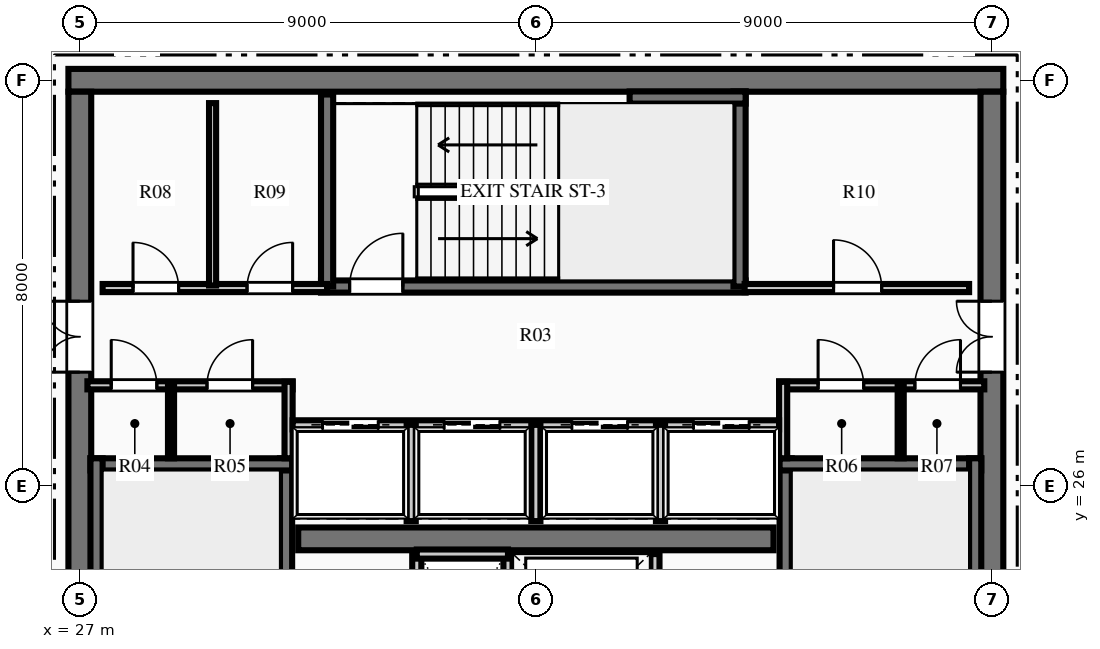
"""IFC4 building model, lengths in metres.
Left out: names, types, materials, properties, quantities, classifications, styles, units other than length and angle.
Written with IfcOpenShell. Run it as: python <this file> out.ifc"""

import sys

from ifc_helpers import new_model, si_unit, direction, frame, frame_2d, origin, place, context, subcontext, project, spatial, rectangle, extrude, element, fill, save


model = new_model("IFC4")
c1 = context("Model", 3, precision=1e-05, world=origin(), true_north=direction((0.0, 1.0)))
c2 = subcontext(c1, "Body", "Model", "MODEL_VIEW")
j1 = project(units=[si_unit("LENGTHUNIT", "METRE"), si_unit("PLANEANGLEUNIT", "RADIAN")], contexts=[c1])
p1 = place(None, origin())
s1 = spatial("IfcSite", under=j1, at=p1, CompositionType="ELEMENT")
p2 = place(p1, origin())
s2 = spatial("IfcBuilding", under=s1, at=p2, CompositionType="ELEMENT")
p3 = place(p2, frame((0.0, 0.0, 343.95)))
s3 = spatial("IfcBuildingStorey", under=s2, at=p3, CompositionType="ELEMENT", Elevation=343.95)
p4 = place(p3, frame((26.775, 34.0, 0.0), z_axis=(0.0, 0.0, 1.0), x_axis=(1.0, 0.0, 0.0)))
e1 = element("IfcWall", 1, at=p4, inside=s3, PredefinedType="SHEAR", context=c2, shape_type="SweptSolid", body=[
    extrude(rectangle(XDim=18.45, YDim=0.45, at=frame_2d((9.225, 0.0))), origin(), (0.0, 0.0, 1.0), 3.75),
])
p5 = place(p3, frame((27.0, 18.225, 0.0), z_axis=(0.0, 0.0, 1.0), x_axis=(0.0, 1.0, 0.0)))
e2 = element("IfcWall", 2, at=p5, inside=s3, PredefinedType="SHEAR", context=c2, shape_type="SweptSolid", body=[
    extrude(rectangle(XDim=15.55, YDim=0.45, at=frame_2d((7.775, 0.0))), origin(), (0.0, 0.0, 1.0), 3.75),
])
p6 = place(p5, frame((10.015, 0.0, 0.0)))
e3 = element("IfcOpeningElement", 3, at=p6, cuts=e2, PredefinedType="OPENING", context=c2, shape_type="SweptSolid", body=[
    extrude(rectangle(XDim=1.4, YDim=2.2, at=frame_2d((0.7, 1.1))), frame((0.0, 0.235, 0.0), z_axis=(0.0, -1.0, 0.0), x_axis=(1.0, 0.0, 0.0)), (0.0, 0.0, 1.0), 0.47),
])
p7 = place(p3, frame((45.0, 18.225, 0.0), z_axis=(0.0, 0.0, 1.0), x_axis=(0.0, 1.0, 0.0)))
e4 = element("IfcWall", 4, at=p7, inside=s3, PredefinedType="SHEAR", context=c2, shape_type="SweptSolid", body=[
    extrude(rectangle(XDim=15.55, YDim=0.45, at=frame_2d((7.775, 0.0))), origin(), (0.0, 0.0, 1.0), 3.75),
])
p8 = place(p7, frame((10.015, 0.0, 0.0)))
e5 = element("IfcOpeningElement", 5, at=p8, cuts=e4, PredefinedType="OPENING", context=c2, shape_type="SweptSolid", body=[
    extrude(rectangle(XDim=1.4, YDim=2.2, at=frame_2d((0.7, 1.1))), frame((0.0, 0.235, 0.0), z_axis=(0.0, -1.0, 0.0), x_axis=(1.0, 0.0, 0.0)), (0.0, 0.0, 1.0), 0.47),
])
p9 = place(p3, frame((31.31, 24.95, 0.0), z_axis=(0.0, 0.0, 1.0), x_axis=(1.0, 0.0, 0.0)))
e6 = element("IfcWall", 6, at=p9, inside=s3, PredefinedType="SHEAR", context=c2, shape_type="SweptSolid", body=[
    extrude(rectangle(XDim=9.38, YDim=0.45, at=frame_2d((4.69, 0.0))), origin(), (0.0, 0.0, 1.0), 3.75),
])
p10 = place(p3, frame((31.07, 18.28, 0.0), z_axis=(0.0, 0.0, 1.0), x_axis=(0.0, 1.0, 0.0)))
e7 = element("IfcWall", 7, at=p10, inside=s3, PredefinedType="SHEAR", context=c2, shape_type="SweptSolid", body=[
    extrude(rectangle(XDim=8.26, YDim=0.24, at=frame_2d((4.13, 0.0))), origin(), (0.0, 0.0, 1.0), 3.75),
])
p11 = place(p10, frame((0.365, 0.0, 0.0)))
e8 = element("IfcOpeningElement", 8, at=p11, cuts=e7, PredefinedType="OPENING", context=c2, shape_type="SweptSolid", body=[
    extrude(rectangle(XDim=1.05, YDim=2.15, at=frame_2d((0.525, 1.075))), frame((0.0, 0.13, 0.0), z_axis=(0.0, -1.0, 0.0), x_axis=(1.0, 0.0, 0.0)), (0.0, 0.0, 1.0), 0.26),
])
p12 = place(p3, frame((27.21, 26.42, 0.0), z_axis=(0.0, 0.0, 1.0), x_axis=(1.0, 0.0, 0.0)))
e9 = element("IfcWall", 9, at=p12, inside=s3, PredefinedType="SHEAR", context=c2, shape_type="SweptSolid", body=[
    extrude(rectangle(XDim=3.98, YDim=0.24, at=frame_2d((1.99, 0.0))), origin(), (0.0, 0.0, 1.0), 3.75),
])
p13 = place(p3, frame((27.33, 18.28, 0.0), z_axis=(0.0, 0.0, 1.0), x_axis=(0.0, 1.0, 0.0)))
e10 = element("IfcWall", 10, at=p13, inside=s3, PredefinedType="SHEAR", context=c2, shape_type="SweptSolid", body=[
    extrude(rectangle(XDim=8.26, YDim=0.24, at=frame_2d((4.13, 0.0))), origin(), (0.0, 0.0, 1.0), 3.75),
])
p14 = place(p3, frame((40.93, 18.28, 0.0), z_axis=(0.0, 0.0, 1.0), x_axis=(0.0, 1.0, 0.0)))
e11 = element("IfcWall", 11, at=p14, inside=s3, PredefinedType="SHEAR", context=c2, shape_type="SweptSolid", body=[
    extrude(rectangle(XDim=8.26, YDim=0.24, at=frame_2d((4.13, 0.0))), origin(), (0.0, 0.0, 1.0), 3.75),
])
p15 = place(p14, frame((0.365, 0.0, 0.0)))
e12 = element("IfcOpeningElement", 12, at=p15, cuts=e11, PredefinedType="OPENING", context=c2, shape_type="SweptSolid", body=[
    extrude(rectangle(XDim=1.05, YDim=2.15, at=frame_2d((0.525, 1.075))), frame((0.0, 0.13, 0.0), z_axis=(0.0, -1.0, 0.0), x_axis=(1.0, 0.0, 0.0)), (0.0, 0.0, 1.0), 0.26),
])
p16 = place(p3, frame((40.81, 26.42, 0.0), z_axis=(0.0, 0.0, 1.0), x_axis=(1.0, 0.0, 0.0)))
e13 = element("IfcWall", 13, at=p16, inside=s3, PredefinedType="SHEAR", context=c2, shape_type="SweptSolid", body=[
    extrude(rectangle(XDim=3.98, YDim=0.24, at=frame_2d((1.99, 0.0))), origin(), (0.0, 0.0, 1.0), 3.75),
])
p17 = place(p3, frame((44.67, 18.28, 0.0), z_axis=(0.0, 0.0, 1.0), x_axis=(0.0, 1.0, 0.0)))
e14 = element("IfcWall", 14, at=p17, inside=s3, PredefinedType="SHEAR", context=c2, shape_type="SweptSolid", body=[
    extrude(rectangle(XDim=8.26, YDim=0.24, at=frame_2d((4.13, 0.0))), origin(), (0.0, 0.0, 1.0), 3.75),
])
p18 = place(p3, frame((31.76, 29.93, 0.0), z_axis=(0.0, 0.0, 1.0), x_axis=(1.0, 0.0, 0.0)))
e15 = element("IfcWall", 15, at=p18, inside=s3, PredefinedType="SHEAR", context=c2, shape_type="SweptSolid", body=[
    extrude(rectangle(XDim=8.38, YDim=0.24, at=frame_2d((4.19, 0.0))), origin(), (0.0, 0.0, 1.0), 3.75),
])
p19 = place(p18, frame((0.565, 0.0, 0.0)))
e16 = element("IfcOpeningElement", 16, at=p19, cuts=e15, PredefinedType="OPENING", context=c2, shape_type="SweptSolid", body=[
    extrude(rectangle(XDim=1.05, YDim=2.15, at=frame_2d((0.525, 1.075))), frame((0.0, 0.13, 0.0), z_axis=(0.0, -1.0, 0.0), x_axis=(1.0, 0.0, 0.0)), (0.0, 0.0, 1.0), 0.26),
])
p20 = place(p3, frame((31.88, 29.93, 0.0), z_axis=(0.0, 0.0, 1.0), x_axis=(0.0, 1.0, 0.0)))
e17 = element("IfcWall", 17, at=p20, inside=s3, PredefinedType="SHEAR", context=c2, shape_type="SweptSolid", body=[
    extrude(rectangle(XDim=3.79, YDim=0.24, at=frame_2d((1.895, 0.0))), origin(), (0.0, 0.0, 1.0), 3.75),
])
p21 = place(p3, frame((40.02, 29.93, 0.0), z_axis=(0.0, 0.0, 1.0), x_axis=(0.0, 1.0, 0.0)))
e18 = element("IfcWall", 18, at=p21, inside=s3, PredefinedType="SHEAR", context=c2, shape_type="SweptSolid", body=[
    extrude(rectangle(XDim=3.85, YDim=0.24, at=frame_2d((1.925, 0.0))), origin(), (0.0, 0.0, 1.0), 3.75),
])
p22 = place(p3, frame((37.85, 33.66, 0.0), z_axis=(0.0, 0.0, 1.0), x_axis=(1.0, 0.0, 0.0)))
e19 = element("IfcWall", 19, at=p22, inside=s3, PredefinedType="SHEAR", context=c2, shape_type="SweptSolid", body=[
    extrude(rectangle(XDim=2.29, YDim=0.24, at=frame_2d((1.145, 0.0))), origin(), (0.0, 0.0, 1.0), 3.75),
])
for number, where, z_axis, x_axis in (
    (20, (33.65, 22.05, 0.0), (0.0, 0.0, 1.0), (0.0, 1.0, 0.0)),
    (21, (35.45, 22.05, 0.0), (0.0, 0.0, 1.0), (0.0, 1.0, 0.0)),
):
    element("IfcWall", number, at=place(p3, frame(where, z_axis=z_axis, x_axis=x_axis)), inside=s3, PredefinedType="PARTITIONING", context=c2, shape_type="SweptSolid", body=[
        extrude(rectangle(XDim=2.6, YDim=0.18, at=frame_2d((1.3, 0.0))), origin(), (0.0, 0.0, 1.0), 3.43),
    ])
p23 = place(p3, frame((33.65, 24.65, 0.0), z_axis=(0.0, 0.0, 1.0), x_axis=(1.0, 0.0, 0.0)))
e22 = element("IfcWall", 22, at=p23, inside=s3, PredefinedType="PARTITIONING", context=c2, shape_type="SweptSolid", body=[
    extrude(rectangle(XDim=1.8, YDim=0.18, at=frame_2d((0.9, 0.0))), origin(), (0.0, 0.0, 1.0), 3.43),
])
p24 = place(p3, frame((38.35, 22.05, 0.0), z_axis=(0.0, 0.0, 1.0), x_axis=(0.0, 1.0, 0.0)))
e23 = element("IfcWall", 23, at=p24, inside=s3, PredefinedType="PARTITIONING", context=c2, shape_type="SweptSolid", body=[
    extrude(rectangle(XDim=2.6, YDim=0.18, at=frame_2d((1.3, 0.0))), origin(), (0.0, 0.0, 1.0), 3.43),
])
p25 = place(p3, frame((27.15, 27.98, 0.0), z_axis=(0.0, 0.0, 1.0), x_axis=(1.0, 0.0, 0.0)))
e24 = element("IfcWall", 24, at=p25, inside=s3, PredefinedType="PARTITIONING", context=c2, shape_type="SweptSolid", body=[
    extrude(rectangle(XDim=4.05, YDim=0.16, at=frame_2d((2.025, 0.0))), origin(), (0.0, 0.0, 1.0), 3.43),
])
p26 = place(p25, frame((0.47, 0.0, 0.0)))
e25 = element("IfcOpeningElement", 25, at=p26, cuts=e24, PredefinedType="OPENING", context=c2, shape_type="SweptSolid", body=[
    extrude(rectangle(XDim=0.9, YDim=2.15, at=frame_2d((0.45, 1.075))), frame((0.0, 0.09, 0.0), z_axis=(0.0, -1.0, 0.0), x_axis=(1.0, 0.0, 0.0)), (0.0, 0.0, 1.0), 0.18),
])
p27 = place(p25, frame((2.36, 0.0, 0.0)))
e26 = element("IfcOpeningElement", 26, at=p27, cuts=e24, PredefinedType="OPENING", context=c2, shape_type="SweptSolid", body=[
    extrude(rectangle(XDim=0.9, YDim=2.15, at=frame_2d((0.45, 1.075))), frame((0.0, 0.09, 0.0), z_axis=(0.0, -1.0, 0.0), x_axis=(1.0, 0.0, 0.0)), (0.0, 0.0, 1.0), 0.18),
])
p28 = place(p3, frame((31.12, 26.54, 0.0), z_axis=(0.0, 0.0, 1.0), x_axis=(0.0, 1.0, 0.0)))
e27 = element("IfcWall", 27, at=p28, inside=s3, PredefinedType="PARTITIONING", context=c2, shape_type="SweptSolid", body=[
    extrude(rectangle(XDim=1.51, YDim=0.16, at=frame_2d((0.755, 0.0))), origin(), (0.0, 0.0, 1.0), 3.43),
])
p29 = place(p3, frame((40.8, 27.98, 0.0), z_axis=(0.0, 0.0, 1.0), x_axis=(1.0, 0.0, 0.0)))
e28 = element("IfcWall", 28, at=p29, inside=s3, PredefinedType="PARTITIONING", context=c2, shape_type="SweptSolid", body=[
    extrude(rectangle(XDim=4.05, YDim=0.16, at=frame_2d((2.025, 0.0))), origin(), (0.0, 0.0, 1.0), 3.43),
])
p30 = place(p29, frame((0.77, 0.0, 0.0)))
e29 = element("IfcOpeningElement", 29, at=p30, cuts=e28, PredefinedType="OPENING", context=c2, shape_type="SweptSolid", body=[
    extrude(rectangle(XDim=0.9, YDim=2.15, at=frame_2d((0.45, 1.075))), frame((0.0, 0.09, 0.0), z_axis=(0.0, -1.0, 0.0), x_axis=(1.0, 0.0, 0.0)), (0.0, 0.0, 1.0), 0.18),
])
p31 = place(p29, frame((2.68, 0.0, 0.0)))
e30 = element("IfcOpeningElement", 30, at=p31, cuts=e28, PredefinedType="OPENING", context=c2, shape_type="SweptSolid", body=[
    extrude(rectangle(XDim=0.9, YDim=2.15, at=frame_2d((0.45, 1.075))), frame((0.0, 0.09, 0.0), z_axis=(0.0, -1.0, 0.0), x_axis=(1.0, 0.0, 0.0)), (0.0, 0.0, 1.0), 0.18),
])
p32 = place(p3, frame((40.88, 26.54, 0.0), z_axis=(0.0, 0.0, 1.0), x_axis=(0.0, 1.0, 0.0)))
e31 = element("IfcWall", 31, at=p32, inside=s3, PredefinedType="PARTITIONING", context=c2, shape_type="SweptSolid", body=[
    extrude(rectangle(XDim=1.51, YDim=0.16, at=frame_2d((0.755, 0.0))), origin(), (0.0, 0.0, 1.0), 3.43),
])
for number, where, z_axis, x_axis in (
    (32, (28.8, 26.54, 0.0), (0.0, 0.0, 1.0), (0.0, 1.0, 0.0)),
    (33, (43.2, 26.54, 0.0), (0.0, 0.0, 1.0), (0.0, 1.0, 0.0)),
):
    element("IfcWall", number, at=place(p3, frame(where, z_axis=z_axis, x_axis=x_axis)), inside=s3, PredefinedType="PARTITIONING", context=c2, shape_type="SweptSolid", body=[
        extrude(rectangle(XDim=1.44, YDim=0.12, at=frame_2d((0.72, 0.0))), origin(), (0.0, 0.0, 1.0), 3.43),
    ])
p33 = place(p3, frame((27.45, 29.9, 0.0), z_axis=(0.0, 0.0, 1.0), x_axis=(1.0, 0.0, 0.0)))
e34 = element("IfcWall", 34, at=p33, inside=s3, PredefinedType="PARTITIONING", context=c2, shape_type="SweptSolid", body=[
    extrude(rectangle(XDim=4.43, YDim=0.16, at=frame_2d((2.215, 0.0))), origin(), (0.0, 0.0, 1.0), 3.43),
])
p34 = place(p33, frame((0.6, 0.0, 0.0)))
e35 = element("IfcOpeningElement", 35, at=p34, cuts=e34, PredefinedType="OPENING", context=c2, shape_type="SweptSolid", body=[
    extrude(rectangle(XDim=0.9, YDim=2.15, at=frame_2d((0.45, 1.075))), frame((0.0, 0.09, 0.0), z_axis=(0.0, -1.0, 0.0), x_axis=(1.0, 0.0, 0.0)), (0.0, 0.0, 1.0), 0.18),
])
p35 = place(p33, frame((2.85, 0.0, 0.0)))
e36 = element("IfcOpeningElement", 36, at=p35, cuts=e34, PredefinedType="OPENING", context=c2, shape_type="SweptSolid", body=[
    extrude(rectangle(XDim=0.9, YDim=2.15, at=frame_2d((0.45, 1.075))), frame((0.0, 0.09, 0.0), z_axis=(0.0, -1.0, 0.0), x_axis=(1.0, 0.0, 0.0)), (0.0, 0.0, 1.0), 0.18),
])
p36 = place(p3, frame((29.62, 29.95, 0.0), z_axis=(0.0, 0.0, 1.0), x_axis=(0.0, 1.0, 0.0)))
e37 = element("IfcWall", 37, at=p36, inside=s3, PredefinedType="PARTITIONING", context=c2, shape_type="SweptSolid", body=[
    extrude(rectangle(XDim=3.6, YDim=0.14, at=frame_2d((1.8, 0.0))), origin(), (0.0, 0.0, 1.0), 3.43),
])
p37 = place(p3, frame((40.12, 29.9, 0.0), z_axis=(0.0, 0.0, 1.0), x_axis=(1.0, 0.0, 0.0)))
e38 = element("IfcWall", 38, at=p37, inside=s3, PredefinedType="PARTITIONING", context=c2, shape_type="SweptSolid", body=[
    extrude(rectangle(XDim=4.43, YDim=0.16, at=frame_2d((2.215, 0.0))), origin(), (0.0, 0.0, 1.0), 3.43),
])
p38 = place(p37, frame((1.755, 0.0, 0.0)))
e39 = element("IfcOpeningElement", 39, at=p38, cuts=e38, PredefinedType="OPENING", context=c2, shape_type="SweptSolid", body=[
    extrude(rectangle(XDim=0.95, YDim=2.15, at=frame_2d((0.475, 1.075))), frame((0.0, 0.09, 0.0), z_axis=(0.0, -1.0, 0.0), x_axis=(1.0, 0.0, 0.0)), (0.0, 0.0, 1.0), 0.18),
])
p39 = place(p3, frame((31.2, 27.2, 0.0), z_axis=(0.0, 0.0, 1.0), x_axis=(1.0, 0.0, 0.0)))
e40 = element("IfcWall", 40, at=p39, inside=s3, PredefinedType="PARTITIONING", context=c2, shape_type="SweptSolid", body=[
    extrude(rectangle(XDim=9.6, YDim=0.18, at=frame_2d((4.8, 0.0))), origin(), (0.0, 0.0, 1.0), 3.43),
])
p40 = place(p39, frame((0.59, 0.0, 0.0)))
e41 = element("IfcOpeningElement", 41, at=p40, cuts=e40, PredefinedType="OPENING", context=c2, shape_type="SweptSolid", body=[
    extrude(rectangle(XDim=1.1, YDim=2.15, at=frame_2d((0.55, 1.075))), frame((0.0, 0.1, 0.0), z_axis=(0.0, -1.0, 0.0), x_axis=(1.0, 0.0, 0.0)), (0.0, 0.0, 1.0), 0.2),
])
p41 = place(p39, frame((2.99, 0.0, 0.0)))
e42 = element("IfcOpeningElement", 42, at=p41, cuts=e40, PredefinedType="OPENING", context=c2, shape_type="SweptSolid", body=[
    extrude(rectangle(XDim=1.1, YDim=2.15, at=frame_2d((0.55, 1.075))), frame((0.0, 0.1, 0.0), z_axis=(0.0, -1.0, 0.0), x_axis=(1.0, 0.0, 0.0)), (0.0, 0.0, 1.0), 0.2),
])
p42 = place(p39, frame((5.51, 0.0, 0.0)))
e43 = element("IfcOpeningElement", 43, at=p42, cuts=e40, PredefinedType="OPENING", context=c2, shape_type="SweptSolid", body=[
    extrude(rectangle(XDim=1.1, YDim=2.15, at=frame_2d((0.55, 1.075))), frame((0.0, 0.1, 0.0), z_axis=(0.0, -1.0, 0.0), x_axis=(1.0, 0.0, 0.0)), (0.0, 0.0, 1.0), 0.2),
])
p43 = place(p39, frame((7.91, 0.0, 0.0)))
e44 = element("IfcOpeningElement", 44, at=p43, cuts=e40, PredefinedType="OPENING", context=c2, shape_type="SweptSolid", body=[
    extrude(rectangle(XDim=1.1, YDim=2.15, at=frame_2d((0.55, 1.075))), frame((0.0, 0.1, 0.0), z_axis=(0.0, -1.0, 0.0), x_axis=(1.0, 0.0, 0.0)), (0.0, 0.0, 1.0), 0.2),
])
for number, where, z_axis, x_axis in (
    (45, (33.54, 25.3, 0.0), (0.0, 0.0, 1.0), (0.0, 1.0, 0.0)),
    (46, (36.0, 25.3, 0.0), (0.0, 0.0, 1.0), (0.0, 1.0, 0.0)),
    (47, (38.46, 25.3, 0.0), (0.0, 0.0, 1.0), (0.0, 1.0, 0.0)),
):
    element("IfcWall", number, at=place(p3, frame(where, z_axis=z_axis, x_axis=x_axis)), inside=s3, PredefinedType="PARTITIONING", context=c2, shape_type="SweptSolid", body=[
        extrude(rectangle(XDim=1.9, YDim=0.18, at=frame_2d((0.95, 0.0))), origin(), (0.0, 0.0, 1.0), 3.43),
    ])
p44 = place(p26, origin())
e48 = element("IfcDoor", 48, at=p44, inside=s3, OperationType="SINGLE_SWING_LEFT", PredefinedType="DOOR", context=c2, shape_type="SweptSolid", body=[
    extrude(rectangle(XDim=0.9, YDim=2.15, at=frame_2d((0.45, 1.075))), frame((0.0, 0.025, 0.0), z_axis=(0.0, -1.0, 0.0), x_axis=(1.0, 0.0, 0.0)), (0.0, 0.0, 1.0), 0.05),
])
fill(e25, e48)
p45 = place(p27, origin())
e49 = element("IfcDoor", 49, at=p45, inside=s3, OperationType="SINGLE_SWING_RIGHT", PredefinedType="DOOR", context=c2, shape_type="SweptSolid", body=[
    extrude(rectangle(XDim=0.9, YDim=2.15, at=frame_2d((0.45, 1.075))), frame((0.0, 0.025, 0.0), z_axis=(0.0, -1.0, 0.0), x_axis=(1.0, 0.0, 0.0)), (0.0, 0.0, 1.0), 0.05),
])
fill(e26, e49)
p46 = place(p30, origin())
e50 = element("IfcDoor", 50, at=p46, inside=s3, OperationType="SINGLE_SWING_LEFT", PredefinedType="DOOR", context=c2, shape_type="SweptSolid", body=[
    extrude(rectangle(XDim=0.9, YDim=2.15, at=frame_2d((0.45, 1.075))), frame((0.0, 0.025, 0.0), z_axis=(0.0, -1.0, 0.0), x_axis=(1.0, 0.0, 0.0)), (0.0, 0.0, 1.0), 0.05),
])
fill(e29, e50)
p47 = place(p31, origin())
e51 = element("IfcDoor", 51, at=p47, inside=s3, OperationType="SINGLE_SWING_RIGHT", PredefinedType="DOOR", context=c2, shape_type="SweptSolid", body=[
    extrude(rectangle(XDim=0.9, YDim=2.15, at=frame_2d((0.45, 1.075))), frame((0.0, 0.025, 0.0), z_axis=(0.0, -1.0, 0.0), x_axis=(1.0, 0.0, 0.0)), (0.0, 0.0, 1.0), 0.05),
])
fill(e30, e51)
p48 = place(p34, origin())
e52 = element("IfcDoor", 52, at=p48, inside=s3, OperationType="SINGLE_SWING_LEFT", PredefinedType="DOOR", context=c2, shape_type="SweptSolid", body=[
    extrude(rectangle(XDim=0.9, YDim=2.15, at=frame_2d((0.45, 1.075))), frame((0.0, 0.025, 0.0), z_axis=(0.0, -1.0, 0.0), x_axis=(1.0, 0.0, 0.0)), (0.0, 0.0, 1.0), 0.05),
])
fill(e35, e52)
p49 = place(p35, origin())
e53 = element("IfcDoor", 53, at=p49, inside=s3, OperationType="SINGLE_SWING_RIGHT", PredefinedType="DOOR", context=c2, shape_type="SweptSolid", body=[
    extrude(rectangle(XDim=0.9, YDim=2.15, at=frame_2d((0.45, 1.075))), frame((0.0, 0.025, 0.0), z_axis=(0.0, -1.0, 0.0), x_axis=(1.0, 0.0, 0.0)), (0.0, 0.0, 1.0), 0.05),
])
fill(e36, e53)
p50 = place(p38, origin())
e54 = element("IfcDoor", 54, at=p50, inside=s3, OperationType="SINGLE_SWING_LEFT", PredefinedType="DOOR", context=c2, shape_type="SweptSolid", body=[
    extrude(rectangle(XDim=0.95, YDim=2.15, at=frame_2d((0.475, 1.075))), frame((0.0, 0.025, 0.0), z_axis=(0.0, -1.0, 0.0), x_axis=(1.0, 0.0, 0.0)), (0.0, 0.0, 1.0), 0.05),
])
fill(e39, e54)
p51 = place(p19, origin())
e55 = element("IfcDoor", 55, at=p51, inside=s3, OperationType="SINGLE_SWING_RIGHT", PredefinedType="DOOR", context=c2, shape_type="SweptSolid", body=[
    extrude(rectangle(XDim=1.05, YDim=2.15, at=frame_2d((0.525, 1.075))), frame((0.0, 0.025, 0.0), z_axis=(0.0, -1.0, 0.0), x_axis=(1.0, 0.0, 0.0)), (0.0, 0.0, 1.0), 0.05),
])
fill(e16, e55)
p52 = place(p6, origin())
e56 = element("IfcDoor", 56, at=p52, inside=s3, OperationType="DOUBLE_DOOR_SINGLE_SWING", PredefinedType="DOOR", context=c2, shape_type="SweptSolid", body=[
    extrude(rectangle(XDim=1.4, YDim=2.2, at=frame_2d((0.7, 1.1))), frame((0.0, 0.025, 0.0), z_axis=(0.0, -1.0, 0.0), x_axis=(1.0, 0.0, 0.0)), (0.0, 0.0, 1.0), 0.05),
])
fill(e3, e56)
p53 = place(p8, origin())
e57 = element("IfcDoor", 57, at=p53, inside=s3, OperationType="DOUBLE_DOOR_SINGLE_SWING", PredefinedType="DOOR", context=c2, shape_type="SweptSolid", body=[
    extrude(rectangle(XDim=1.4, YDim=2.2, at=frame_2d((0.7, 1.1))), frame((0.0, 0.025, 0.0), z_axis=(0.0, -1.0, 0.0), x_axis=(1.0, 0.0, 0.0)), (0.0, 0.0, 1.0), 0.05),
])
fill(e5, e57)
p54 = place(p40, origin())
e58 = element("IfcDoor", 58, at=p54, inside=s3, OperationType="SLIDING_TO_LEFT", PredefinedType="DOOR", context=c2, shape_type="SweptSolid", body=[
    extrude(rectangle(XDim=1.1, YDim=2.15, at=frame_2d((0.55, 1.075))), frame((0.0, 0.025, 0.0), z_axis=(0.0, -1.0, 0.0), x_axis=(1.0, 0.0, 0.0)), (0.0, 0.0, 1.0), 0.05),
])
fill(e41, e58)
p55 = place(p41, origin())
e59 = element("IfcDoor", 59, at=p55, inside=s3, OperationType="SLIDING_TO_LEFT", PredefinedType="DOOR", context=c2, shape_type="SweptSolid", body=[
    extrude(rectangle(XDim=1.1, YDim=2.15, at=frame_2d((0.55, 1.075))), frame((0.0, 0.025, 0.0), z_axis=(0.0, -1.0, 0.0), x_axis=(1.0, 0.0, 0.0)), (0.0, 0.0, 1.0), 0.05),
])
fill(e42, e59)
p56 = place(p42, origin())
e60 = element("IfcDoor", 60, at=p56, inside=s3, OperationType="SLIDING_TO_LEFT", PredefinedType="DOOR", context=c2, shape_type="SweptSolid", body=[
    extrude(rectangle(XDim=1.1, YDim=2.15, at=frame_2d((0.55, 1.075))), frame((0.0, 0.025, 0.0), z_axis=(0.0, -1.0, 0.0), x_axis=(1.0, 0.0, 0.0)), (0.0, 0.0, 1.0), 0.05),
])
fill(e43, e60)
p57 = place(p43, origin())
e61 = element("IfcDoor", 61, at=p57, inside=s3, OperationType="SLIDING_TO_LEFT", PredefinedType="DOOR", context=c2, shape_type="SweptSolid", body=[
    extrude(rectangle(XDim=1.1, YDim=2.15, at=frame_2d((0.55, 1.075))), frame((0.0, 0.025, 0.0), z_axis=(0.0, -1.0, 0.0), x_axis=(1.0, 0.0, 0.0)), (0.0, 0.0, 1.0), 0.05),
])
fill(e44, e61)
save(model, sys.argv[1])
